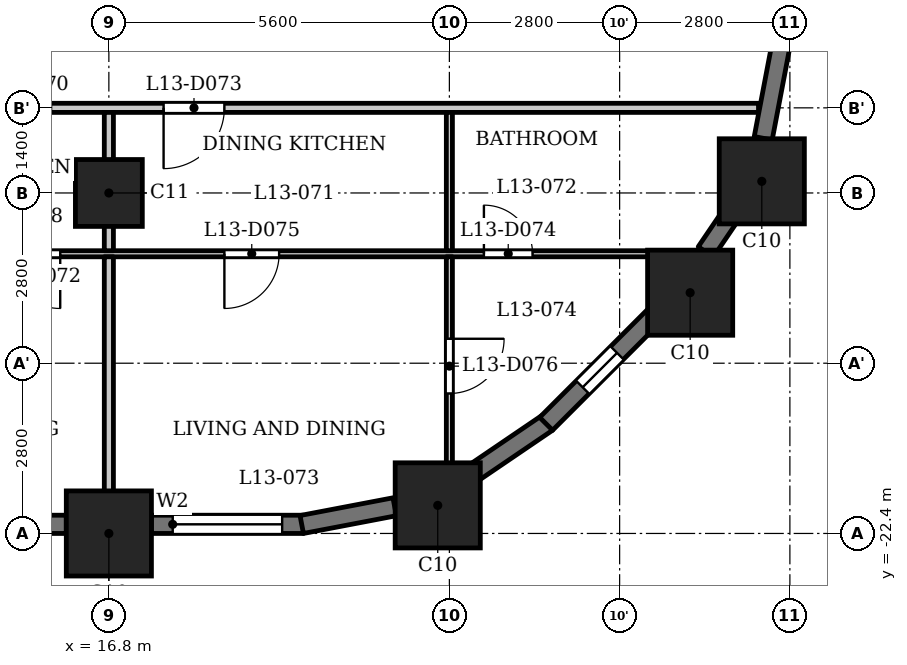
"""IFC4 building model, lengths in metres.
Left out: names, types, materials, properties, quantities, classifications, styles, units other than length and angle.
Written with IfcOpenShell. Run it as: python <this file> out.ifc"""

import sys

from ifc_helpers import new_model, si_unit, direction, frame, frame_2d, origin, origin_2d, place, context, subcontext, project, spatial, rectangle, extrude, element, fill, save


model = new_model("IFC4")
c1 = context("Model", 3, precision=1e-05, world=origin(), true_north=direction((0.0, 1.0)))
c2 = subcontext(c1, "Body", "Model", "MODEL_VIEW")
j1 = project(units=[si_unit("LENGTHUNIT", "METRE"), si_unit("PLANEANGLEUNIT", "RADIAN")], contexts=[c1])
p1 = place(None, origin())
s1 = spatial("IfcSite", under=j1, at=p1, CompositionType="ELEMENT")
p2 = place(p1, origin())
s2 = spatial("IfcBuilding", under=s1, at=p2, CompositionType="ELEMENT")
p3 = place(p2, frame((0.0, 0.0, 55.0)))
s3 = spatial("IfcBuildingStorey", under=s2, at=p3, CompositionType="ELEMENT", Elevation=55.0)
for number, where, z_axis, x_axis in (
    (1, (16.8, -22.4, 0.0), (0.0, 0.0, 1.0), (1.0, 0.0, 0.0)),
    (2, (22.209, -21.938, 0.0), (0.0, 0.0, 1.0), (1.0, 0.0, 0.0)),
    (3, (26.36, -18.44, 0.0), (0.0, 0.0, 1.0), (1.0, 0.0, 0.0)),
    (4, (27.538, -16.609, 0.0), (0.0, 0.0, 1.0), (1.0, 0.0, 0.0)),
):
    element("IfcColumn", number, at=place(p3, frame(where, z_axis=z_axis, x_axis=x_axis)), inside=s3, PredefinedType="COLUMN", context=c2, shape_type="SweptSolid", body=[
        extrude(rectangle(XDim=1.4, YDim=1.4, at=origin_2d()), origin(), (0.0, 0.0, 1.0), 3.5),
    ])
p4 = place(p3, frame((16.8, -16.8, 0.0), z_axis=(0.0, 0.0, 1.0), x_axis=(1.0, 0.0, 0.0)))
e5 = element("IfcColumn", 5, at=p4, inside=s3, PredefinedType="COLUMN", context=c2, shape_type="SweptSolid", body=[
    extrude(rectangle(XDim=1.1, YDim=1.1, at=origin_2d()), origin(), (0.0, 0.0, 1.0), 3.5),
])
p5 = place(p3, frame((11.9, -22.25, 0.0), z_axis=(0.0, 0.0, 1.0), x_axis=(1.0, 0.0, 0.0)))
e6 = element("IfcWall", 6, at=p5, inside=s3, PredefinedType="SOLIDWALL", context=c2, shape_type="SweptSolid", body=[
    extrude(rectangle(XDim=4.2, YDim=0.3, at=frame_2d((2.1, 0.0))), origin(), (0.0, 0.0, 1.0), 2.35),
])
p6 = place(p5, frame((0.3, 0.0, 1.2)))
e7 = element("IfcOpeningElement", 7, at=p6, cuts=e6, PredefinedType="OPENING", context=c2, shape_type="SweptSolid", body=[
    extrude(rectangle(XDim=3.6, YDim=0.95, at=frame_2d((1.8, 0.475))), frame((0.0, 0.16, 0.0), z_axis=(0.0, -1.0, 0.0), x_axis=(1.0, 0.0, 0.0)), (0.0, 0.0, 1.0), 0.32),
])
p7 = place(p3, frame((17.5, -22.25, 0.0), z_axis=(0.0, 0.0, 1.0), x_axis=(1.0, 0.0, 0.0)))
e8 = element("IfcWall", 8, at=p7, inside=s3, PredefinedType="SOLIDWALL", context=c2, shape_type="SweptSolid", body=[
    extrude(rectangle(XDim=2.5, YDim=0.3, at=frame_2d((1.25, 0.0))), origin(), (0.0, 0.0, 1.0), 2.35),
])
p8 = place(p7, frame((0.35, 0.0, 0.9)))
e9 = element("IfcOpeningElement", 9, at=p8, cuts=e8, PredefinedType="OPENING", context=c2, shape_type="SweptSolid", body=[
    extrude(rectangle(XDim=1.8, YDim=1.25, at=frame_2d((0.9, 0.625))), frame((0.0, 0.16, 0.0), z_axis=(0.0, -1.0, 0.0), x_axis=(1.0, 0.0, 0.0)), (0.0, 0.0, 1.0), 0.32),
])
p9 = place(p3, frame((19.972, -22.253, 0.0), z_axis=(0.0, 0.0, 1.0), x_axis=(0.982297345734, 0.187328386968, 0.0)))
e10 = element("IfcWall", 10, at=p9, inside=s3, PredefinedType="SOLIDWALL", context=c2, shape_type="SweptSolid", body=[
    extrude(rectangle(XDim=1.556, YDim=0.3, at=frame_2d((0.778, 0.0))), origin(), (0.0, 0.0, 1.0), 2.35),
])
p10 = place(p3, frame((22.726, -21.454, 0.0), z_axis=(0.0, 0.0, 1.0), x_axis=(0.827019875346, 0.562172683241, 0.0)))
e11 = element("IfcWall", 11, at=p10, inside=s3, PredefinedType="SOLIDWALL", context=c2, shape_type="SweptSolid", body=[
    extrude(rectangle(XDim=1.556, YDim=0.3, at=frame_2d((0.778, 0.0))), origin(), (0.0, 0.0, 1.0), 2.35),
])
p11 = place(p3, frame((23.991, -20.597, 0.0), z_axis=(0.0, 0.0, 1.0), x_axis=(0.707106781187, 0.707106781187, 0.0)))
e12 = element("IfcWall", 12, at=p11, inside=s3, PredefinedType="SOLIDWALL", context=c2, shape_type="SweptSolid", body=[
    extrude(rectangle(XDim=2.5, YDim=0.3, at=frame_2d((1.25, 0.0))), origin(), (0.0, 0.0, 1.0), 2.35),
])
p12 = place(p11, frame((0.85, 0.0, 0.6)))
e13 = element("IfcOpeningElement", 13, at=p12, cuts=e12, PredefinedType="OPENING", context=c2, shape_type="SweptSolid", body=[
    extrude(rectangle(XDim=0.8, YDim=1.55, at=frame_2d((0.4, 0.775))), frame((0.0, 0.16, 0.0), z_axis=(0.0, -1.0, 0.0), x_axis=(1.0, 0.0, 0.0)), (0.0, 0.0, 1.0), 0.32),
])
p13 = place(p3, frame((26.617, -17.769, 0.0), z_axis=(0.0, 0.0, 1.0), x_axis=(0.562000651531, 0.827136788977, 0.0)))
e14 = element("IfcWall", 14, at=p13, inside=s3, PredefinedType="SOLIDWALL", context=c2, shape_type="SweptSolid", body=[
    extrude(rectangle(XDim=0.777, YDim=0.3, at=frame_2d((0.389, 0.0))), origin(), (0.0, 0.0, 1.0), 3.2),
])
p14 = place(p3, frame((27.561, -15.9, 0.0), z_axis=(0.0, 0.0, 1.0), x_axis=(0.187328386968, 0.982297345734, 0.0)))
e15 = element("IfcWall", 15, at=p14, inside=s3, PredefinedType="SOLIDWALL", context=c2, shape_type="SweptSolid", body=[
    extrude(rectangle(XDim=1.556, YDim=0.3, at=frame_2d((0.778, 0.0))), origin(), (0.0, 0.0, 1.0), 2.35),
])
p15 = place(p3, frame((-26.394, -17.8, 0.0), z_axis=(0.0, 0.0, 1.0), x_axis=(1.0, 0.0, 0.0)))
e16 = element("IfcWall", 16, at=p15, inside=s3, PredefinedType="PARTITIONING", context=c2, shape_type="SweptSolid", body=[
    extrude(rectangle(XDim=53.034, YDim=0.1, at=frame_2d((26.517, 0.0))), origin(), (0.0, 0.0, 1.0), 3.2),
])
p16 = place(p15, frame((0.794, 0.0, 0.0)))
e17 = element("IfcOpeningElement", 17, at=p16, cuts=e16, PredefinedType="OPENING", context=c2, shape_type="SweptSolid", body=[
    extrude(rectangle(XDim=0.8, YDim=2.1, at=frame_2d((0.4, 1.05))), frame((0.0, 0.06, 0.0), z_axis=(0.0, -1.0, 0.0), x_axis=(1.0, 0.0, 0.0)), (0.0, 0.0, 1.0), 0.12),
])
p17 = place(p15, frame((5.644, 0.0, 0.0)))
e18 = element("IfcOpeningElement", 18, at=p17, cuts=e16, PredefinedType="OPENING", context=c2, shape_type="SweptSolid", body=[
    extrude(rectangle(XDim=0.9, YDim=2.1, at=frame_2d((0.45, 1.05))), frame((0.0, 0.06, 0.0), z_axis=(0.0, -1.0, 0.0), x_axis=(1.0, 0.0, 0.0)), (0.0, 0.0, 1.0), 0.12),
])
p18 = place(p15, frame((19.344, 0.0, 0.0)))
e19 = element("IfcOpeningElement", 19, at=p18, cuts=e16, PredefinedType="OPENING", context=c2, shape_type="SweptSolid", body=[
    extrude(rectangle(XDim=0.8, YDim=2.1, at=frame_2d((0.4, 1.05))), frame((0.0, 0.06, 0.0), z_axis=(0.0, -1.0, 0.0), x_axis=(1.0, 0.0, 0.0)), (0.0, 0.0, 1.0), 0.12),
])
p19 = place(p15, frame((17.094, 0.0, 0.0)))
e20 = element("IfcOpeningElement", 20, at=p19, cuts=e16, PredefinedType="OPENING", context=c2, shape_type="SweptSolid", body=[
    extrude(rectangle(XDim=0.9, YDim=2.1, at=frame_2d((0.45, 1.05))), frame((0.0, 0.06, 0.0), z_axis=(0.0, -1.0, 0.0), x_axis=(1.0, 0.0, 0.0)), (0.0, 0.0, 1.0), 0.12),
])
p20 = place(p15, frame((10.494, 0.0, 0.0)))
e21 = element("IfcOpeningElement", 21, at=p20, cuts=e16, PredefinedType="OPENING", context=c2, shape_type="SweptSolid", body=[
    extrude(rectangle(XDim=0.9, YDim=2.1, at=frame_2d((0.45, 1.05))), frame((0.0, 0.06, 0.0), z_axis=(0.0, -1.0, 0.0), x_axis=(1.0, 0.0, 0.0)), (0.0, 0.0, 1.0), 0.12),
])
p21 = place(p15, frame((13.294, 0.0, 0.0)))
e22 = element("IfcOpeningElement", 22, at=p21, cuts=e16, PredefinedType="OPENING", context=c2, shape_type="SweptSolid", body=[
    extrude(rectangle(XDim=0.9, YDim=2.1, at=frame_2d((0.45, 1.05))), frame((0.0, 0.06, 0.0), z_axis=(0.0, -1.0, 0.0), x_axis=(1.0, 0.0, 0.0)), (0.0, 0.0, 1.0), 0.12),
])
p22 = place(p15, frame((27.044, 0.0, 0.0)))
e23 = element("IfcOpeningElement", 23, at=p22, cuts=e16, PredefinedType="OPENING", context=c2, shape_type="SweptSolid", body=[
    extrude(rectangle(XDim=0.8, YDim=2.1, at=frame_2d((0.4, 1.05))), frame((0.0, 0.06, 0.0), z_axis=(0.0, -1.0, 0.0), x_axis=(1.0, 0.0, 0.0)), (0.0, 0.0, 1.0), 0.12),
])
p23 = place(p15, frame((22.444, 0.0, 0.0)))
e24 = element("IfcOpeningElement", 24, at=p23, cuts=e16, PredefinedType="OPENING", context=c2, shape_type="SweptSolid", body=[
    extrude(rectangle(XDim=0.9, YDim=2.1, at=frame_2d((0.45, 1.05))), frame((0.0, 0.06, 0.0), z_axis=(0.0, -1.0, 0.0), x_axis=(1.0, 0.0, 0.0)), (0.0, 0.0, 1.0), 0.12),
])
p24 = place(p15, frame((36.144, 0.0, 0.0)))
e25 = element("IfcOpeningElement", 25, at=p24, cuts=e16, PredefinedType="OPENING", context=c2, shape_type="SweptSolid", body=[
    extrude(rectangle(XDim=0.8, YDim=2.1, at=frame_2d((0.4, 1.05))), frame((0.0, 0.06, 0.0), z_axis=(0.0, -1.0, 0.0), x_axis=(1.0, 0.0, 0.0)), (0.0, 0.0, 1.0), 0.12),
])
p25 = place(p15, frame((33.644, 0.0, 0.0)))
e26 = element("IfcOpeningElement", 26, at=p25, cuts=e16, PredefinedType="OPENING", context=c2, shape_type="SweptSolid", body=[
    extrude(rectangle(XDim=0.9, YDim=2.1, at=frame_2d((0.45, 1.05))), frame((0.0, 0.06, 0.0), z_axis=(0.0, -1.0, 0.0), x_axis=(1.0, 0.0, 0.0)), (0.0, 0.0, 1.0), 0.12),
])
p26 = place(p15, frame((39.144, 0.0, 0.0)))
e27 = element("IfcOpeningElement", 27, at=p26, cuts=e16, PredefinedType="OPENING", context=c2, shape_type="SweptSolid", body=[
    extrude(rectangle(XDim=0.8, YDim=2.1, at=frame_2d((0.4, 1.05))), frame((0.0, 0.06, 0.0), z_axis=(0.0, -1.0, 0.0), x_axis=(1.0, 0.0, 0.0)), (0.0, 0.0, 1.0), 0.12),
])
p27 = place(p15, frame((41.494, 0.0, 0.0)))
e28 = element("IfcOpeningElement", 28, at=p27, cuts=e16, PredefinedType="OPENING", context=c2, shape_type="SweptSolid", body=[
    extrude(rectangle(XDim=0.9, YDim=2.1, at=frame_2d((0.45, 1.05))), frame((0.0, 0.06, 0.0), z_axis=(0.0, -1.0, 0.0), x_axis=(1.0, 0.0, 0.0)), (0.0, 0.0, 1.0), 0.12),
])
p28 = place(p15, frame((49.362, 0.0, 0.0)))
e29 = element("IfcOpeningElement", 29, at=p28, cuts=e16, PredefinedType="OPENING", context=c2, shape_type="SweptSolid", body=[
    extrude(rectangle(XDim=0.8, YDim=2.1, at=frame_2d((0.4, 1.05))), frame((0.0, 0.06, 0.0), z_axis=(0.0, -1.0, 0.0), x_axis=(1.0, 0.0, 0.0)), (0.0, 0.0, 1.0), 0.12),
])
p29 = place(p15, frame((45.094, 0.0, 0.0)))
e30 = element("IfcOpeningElement", 30, at=p29, cuts=e16, PredefinedType="OPENING", context=c2, shape_type="SweptSolid", body=[
    extrude(rectangle(XDim=0.9, YDim=2.1, at=frame_2d((0.45, 1.05))), frame((0.0, 0.06, 0.0), z_axis=(0.0, -1.0, 0.0), x_axis=(1.0, 0.0, 0.0)), (0.0, 0.0, 1.0), 0.12),
])
p30 = place(p3, frame((-27.484, -15.4, 0.0), z_axis=(0.0, 0.0, 1.0), x_axis=(1.0, 0.0, 0.0)))
e31 = element("IfcWall", 31, at=p30, inside=s3, PredefinedType="PARTITIONING", context=c2, shape_type="SweptSolid", body=[
    extrude(rectangle(XDim=54.968, YDim=0.15, at=frame_2d((27.484, 0.0))), origin(), (0.0, 0.0, 1.0), 3.2),
])
p31 = place(p30, frame((5.734, 0.0, 0.0)))
e32 = element("IfcOpeningElement", 32, at=p31, cuts=e31, PredefinedType="OPENING", context=c2, shape_type="SweptSolid", body=[
    extrude(rectangle(XDim=1.0, YDim=2.1, at=frame_2d((0.5, 1.05))), frame((0.0, 0.085, 0.0), z_axis=(0.0, -1.0, 0.0), x_axis=(1.0, 0.0, 0.0)), (0.0, 0.0, 1.0), 0.17),
])
p32 = place(p30, frame((11.584, 0.0, 0.0)))
e33 = element("IfcOpeningElement", 33, at=p32, cuts=e31, PredefinedType="OPENING", context=c2, shape_type="SweptSolid", body=[
    extrude(rectangle(XDim=1.0, YDim=2.1, at=frame_2d((0.5, 1.05))), frame((0.0, 0.085, 0.0), z_axis=(0.0, -1.0, 0.0), x_axis=(1.0, 0.0, 0.0)), (0.0, 0.0, 1.0), 0.17),
])
p33 = place(p30, frame((22.534, 0.0, 0.0)))
e34 = element("IfcOpeningElement", 34, at=p33, cuts=e31, PredefinedType="OPENING", context=c2, shape_type="SweptSolid", body=[
    extrude(rectangle(XDim=1.0, YDim=2.1, at=frame_2d((0.5, 1.05))), frame((0.0, 0.085, 0.0), z_axis=(0.0, -1.0, 0.0), x_axis=(1.0, 0.0, 0.0)), (0.0, 0.0, 1.0), 0.17),
])
p34 = place(p30, frame((33.734, 0.0, 0.0)))
e35 = element("IfcOpeningElement", 35, at=p34, cuts=e31, PredefinedType="OPENING", context=c2, shape_type="SweptSolid", body=[
    extrude(rectangle(XDim=1.0, YDim=2.1, at=frame_2d((0.5, 1.05))), frame((0.0, 0.085, 0.0), z_axis=(0.0, -1.0, 0.0), x_axis=(1.0, 0.0, 0.0)), (0.0, 0.0, 1.0), 0.17),
])
p35 = place(p30, frame((42.334, 0.0, 0.0)))
e36 = element("IfcOpeningElement", 36, at=p35, cuts=e31, PredefinedType="OPENING", context=c2, shape_type="SweptSolid", body=[
    extrude(rectangle(XDim=1.0, YDim=2.1, at=frame_2d((0.5, 1.05))), frame((0.0, 0.085, 0.0), z_axis=(0.0, -1.0, 0.0), x_axis=(1.0, 0.0, 0.0)), (0.0, 0.0, 1.0), 0.17),
])
p36 = place(p30, frame((45.184, 0.0, 0.0)))
e37 = element("IfcOpeningElement", 37, at=p36, cuts=e31, PredefinedType="OPENING", context=c2, shape_type="SweptSolid", body=[
    extrude(rectangle(XDim=1.0, YDim=2.1, at=frame_2d((0.5, 1.05))), frame((0.0, 0.085, 0.0), z_axis=(0.0, -1.0, 0.0), x_axis=(1.0, 0.0, 0.0)), (0.0, 0.0, 1.0), 0.17),
])
p37 = place(p3, frame((16.8, -23.08, 0.0), z_axis=(0.0, 0.0, 1.0), x_axis=(0.0, 1.0, 0.0)))
e38 = element("IfcWall", 38, at=p37, inside=s3, PredefinedType="PARTITIONING", context=c2, shape_type="SweptSolid", body=[
    extrude(rectangle(XDim=5.23, YDim=0.15, at=frame_2d((2.615, 0.0))), origin(), (0.0, 0.0, 1.0), 3.2),
])
p38 = place(p3, frame((16.8, -17.75, 0.0), z_axis=(0.0, 0.0, 1.0), x_axis=(0.0, 1.0, 0.0)))
e39 = element("IfcWall", 39, at=p38, inside=s3, PredefinedType="PARTITIONING", context=c2, shape_type="SweptSolid", body=[
    extrude(rectangle(XDim=2.275, YDim=0.15, at=frame_2d((1.137, 0.0))), origin(), (0.0, 0.0, 1.0), 3.2),
])
p39 = place(p3, frame((22.4, -21.72, 0.0), z_axis=(0.0, 0.0, 1.0), x_axis=(0.0, 1.0, 0.0)))
e40 = element("IfcWall", 40, at=p39, inside=s3, PredefinedType="PARTITIONING", context=c2, shape_type="SweptSolid", body=[
    extrude(rectangle(XDim=3.87, YDim=0.1, at=frame_2d((1.935, 0.0))), origin(), (0.0, 0.0, 1.0), 3.2),
])
p40 = place(p39, frame((1.622, 0.0, 0.0)))
e41 = element("IfcOpeningElement", 41, at=p40, cuts=e40, PredefinedType="OPENING", context=c2, shape_type="SweptSolid", body=[
    extrude(rectangle(XDim=0.9, YDim=2.1, at=frame_2d((0.45, 1.05))), frame((0.0, 0.06, 0.0), z_axis=(0.0, -1.0, 0.0), x_axis=(1.0, 0.0, 0.0)), (0.0, 0.0, 1.0), 0.12),
])
p41 = place(p3, frame((22.4, -17.75, 0.0), z_axis=(0.0, 0.0, 1.0), x_axis=(0.0, 1.0, 0.0)))
e42 = element("IfcWall", 42, at=p41, inside=s3, PredefinedType="PARTITIONING", context=c2, shape_type="SweptSolid", body=[
    extrude(rectangle(XDim=2.275, YDim=0.1, at=frame_2d((1.137, 0.0))), origin(), (0.0, 0.0, 1.0), 3.2),
])
p42 = place(p27, origin())
e43 = element("IfcDoor", 43, at=p42, inside=s3, OperationType="SINGLE_SWING_RIGHT", PredefinedType="DOOR", context=c2, shape_type="SweptSolid", body=[
    extrude(rectangle(XDim=0.9, YDim=2.1, at=frame_2d((0.45, 1.05))), frame((0.0, 0.025, 0.0), z_axis=(0.0, -1.0, 0.0), x_axis=(1.0, 0.0, 0.0)), (0.0, 0.0, 1.0), 0.05),
])
fill(e28, e43)
p43 = place(p36, origin())
e44 = element("IfcDoor", 44, at=p43, inside=s3, OperationType="SINGLE_SWING_LEFT", PredefinedType="DOOR", context=c2, shape_type="SweptSolid", body=[
    extrude(rectangle(XDim=1.0, YDim=2.1, at=frame_2d((0.5, 1.05))), frame((0.0, 0.025, 0.0), z_axis=(0.0, -1.0, 0.0), x_axis=(1.0, 0.0, 0.0)), (0.0, 0.0, 1.0), 0.05),
])
fill(e37, e44)
p44 = place(p28, origin())
e45 = element("IfcDoor", 45, at=p44, inside=s3, OperationType="SINGLE_SWING_RIGHT", PredefinedType="DOOR", context=c2, shape_type="SweptSolid", body=[
    extrude(rectangle(XDim=0.8, YDim=2.1, at=frame_2d((0.4, 1.05))), frame((0.0, 0.025, 0.0), z_axis=(0.0, -1.0, 0.0), x_axis=(1.0, 0.0, 0.0)), (0.0, 0.0, 1.0), 0.05),
])
fill(e29, e45)
p45 = place(p29, origin())
e46 = element("IfcDoor", 46, at=p45, inside=s3, OperationType="SINGLE_SWING_LEFT", PredefinedType="DOOR", context=c2, shape_type="SweptSolid", body=[
    extrude(rectangle(XDim=0.9, YDim=2.1, at=frame_2d((0.45, 1.05))), frame((0.0, 0.025, 0.0), z_axis=(0.0, -1.0, 0.0), x_axis=(1.0, 0.0, 0.0)), (0.0, 0.0, 1.0), 0.05),
])
fill(e30, e46)
p46 = place(p40, origin())
e47 = element("IfcDoor", 47, at=p46, inside=s3, OperationType="SINGLE_SWING_RIGHT", PredefinedType="DOOR", context=c2, shape_type="SweptSolid", body=[
    extrude(rectangle(XDim=0.9, YDim=2.1, at=frame_2d((0.45, 1.05))), frame((0.0, 0.025, 0.0), z_axis=(0.0, -1.0, 0.0), x_axis=(1.0, 0.0, 0.0)), (0.0, 0.0, 1.0), 0.05),
])
fill(e41, e47)
p47 = place(p8, origin())
e48 = element("IfcWindow", 48, at=p47, inside=s3, PartitioningType="SINGLE_PANEL", PredefinedType="WINDOW", context=c2, shape_type="SweptSolid", body=[
    extrude(rectangle(XDim=1.8, YDim=1.25, at=frame_2d((0.9, 0.625))), frame((0.0, 0.03, 0.0), z_axis=(0.0, -1.0, 0.0), x_axis=(1.0, 0.0, 0.0)), (0.0, 0.0, 1.0), 0.06),
])
fill(e9, e48)
p48 = place(p12, origin())
e49 = element("IfcWindow", 49, at=p48, inside=s3, PartitioningType="SINGLE_PANEL", PredefinedType="WINDOW", context=c2, shape_type="SweptSolid", body=[
    extrude(rectangle(XDim=0.8, YDim=1.55, at=frame_2d((0.4, 0.775))), frame((0.0, 0.03, 0.0), z_axis=(0.0, -1.0, 0.0), x_axis=(1.0, 0.0, 0.0)), (0.0, 0.0, 1.0), 0.06),
])
fill(e13, e49)
save(model, sys.argv[1])
